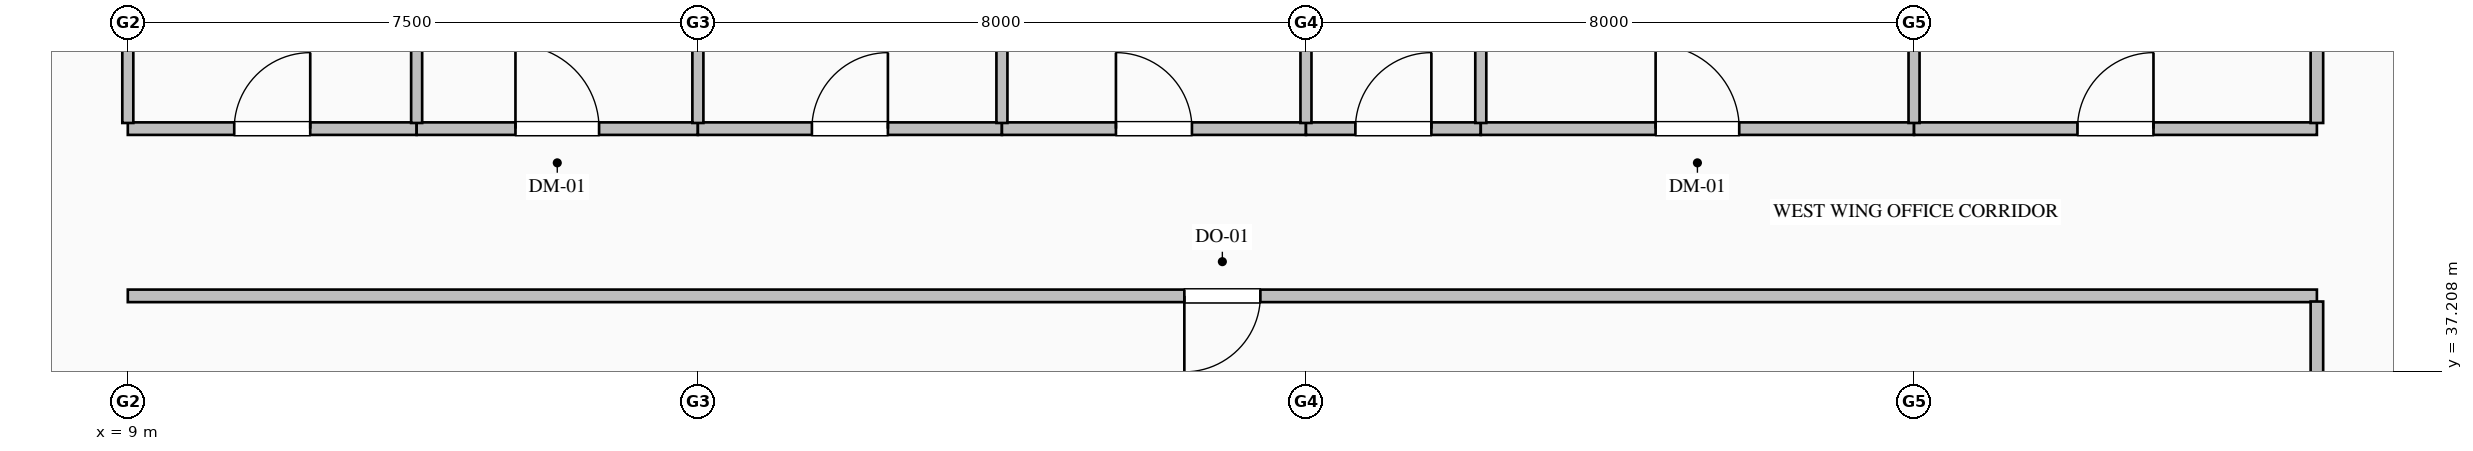
"""IFC4 building model, lengths in metres.
Left out: names, types, materials, properties, quantities, classifications, styles, units other than length and angle.
Written with IfcOpenShell. Run it as: python <this file> out.ifc"""

import sys

from ifc_helpers import new_model, si_unit, direction, frame, frame_2d, origin, place, context, subcontext, project, spatial, rectangle, extrude, element, fill, save


model = new_model("IFC4")
c1 = context("Model", 3, precision=1e-05, world=origin(), true_north=direction((0.0, 1.0)))
c2 = subcontext(c1, "Body", "Model", "MODEL_VIEW")
j1 = project(units=[si_unit("LENGTHUNIT", "METRE"), si_unit("PLANEANGLEUNIT", "RADIAN")], contexts=[c1])
p1 = place(None, origin())
s1 = spatial("IfcSite", under=j1, at=p1, CompositionType="ELEMENT")
p2 = place(p1, origin())
s2 = spatial("IfcBuilding", under=s1, at=p2, CompositionType="ELEMENT")
p3 = place(p2, frame((0.0, 0.0, 36.2)))
s3 = spatial("IfcBuildingStorey", under=s2, at=p3, CompositionType="ELEMENT", Elevation=36.2)
p4 = place(p3, frame((37.8, 38.2, 0.0), z_axis=(0.0, 0.0, 1.0), x_axis=(-1.0, 0.0, 0.0)))
e1 = element("IfcWall", 1, at=p4, inside=s3, PredefinedType="PARTITIONING", context=c2, shape_type="SweptSolid", body=[
    extrude(rectangle(XDim=28.8, YDim=0.165, at=frame_2d((14.4, 0.0))), origin(), (0.0, 0.0, 1.0), 3.75),
])
p5 = place(p4, frame((13.9, 0.0, 0.0)))
e2 = element("IfcOpeningElement", 2, at=p5, cuts=e1, PredefinedType="OPENING", context=c2, shape_type="SweptSolid", body=[
    extrude(rectangle(XDim=1.0, YDim=2.15, at=frame_2d((0.5, 1.075))), frame((0.0, 0.093, 0.0), z_axis=(0.0, -1.0, 0.0), x_axis=(1.0, 0.0, 0.0)), (0.0, 0.0, 1.0), 0.185),
])
p6 = place(p3, frame((9.0, 40.4, 0.0), z_axis=(0.0, 0.0, 1.0), x_axis=(1.0, 0.0, 0.0)))
e3 = element("IfcWall", 3, at=p6, inside=s3, PredefinedType="PARTITIONING", context=c2, shape_type="SweptSolid", body=[
    extrude(rectangle(XDim=3.8, YDim=0.165, at=frame_2d((1.9, 0.0))), origin(), (0.0, 0.0, 1.0), 3.75),
])
p7 = place(p6, frame((1.4, 0.0, 0.0)))
e4 = element("IfcOpeningElement", 4, at=p7, cuts=e3, PredefinedType="OPENING", context=c2, shape_type="SweptSolid", body=[
    extrude(rectangle(XDim=1.0, YDim=2.15, at=frame_2d((0.5, 1.075))), frame((0.0, 0.093, 0.0), z_axis=(0.0, -1.0, 0.0), x_axis=(1.0, 0.0, 0.0)), (0.0, 0.0, 1.0), 0.185),
])
p8 = place(p3, frame((12.8, 40.4, 0.0), z_axis=(0.0, 0.0, 1.0), x_axis=(1.0, 0.0, 0.0)))
e5 = element("IfcWall", 5, at=p8, inside=s3, PredefinedType="PARTITIONING", context=c2, shape_type="SweptSolid", body=[
    extrude(rectangle(XDim=3.7, YDim=0.165, at=frame_2d((1.85, 0.0))), origin(), (0.0, 0.0, 1.0), 3.75),
])
p9 = place(p8, frame((1.3, 0.0, 0.0)))
e6 = element("IfcOpeningElement", 6, at=p9, cuts=e5, PredefinedType="OPENING", context=c2, shape_type="SweptSolid", body=[
    extrude(rectangle(XDim=1.1, YDim=2.2, at=frame_2d((0.55, 1.1))), frame((0.0, 0.093, 0.0), z_axis=(0.0, -1.0, 0.0), x_axis=(1.0, 0.0, 0.0)), (0.0, 0.0, 1.0), 0.185),
])
p10 = place(p3, frame((16.5, 40.4, 0.0), z_axis=(0.0, 0.0, 1.0), x_axis=(1.0, 0.0, 0.0)))
e7 = element("IfcWall", 7, at=p10, inside=s3, PredefinedType="PARTITIONING", context=c2, shape_type="SweptSolid", body=[
    extrude(rectangle(XDim=4.0, YDim=0.165, at=frame_2d((2.0, 0.0))), origin(), (0.0, 0.0, 1.0), 3.75),
])
p11 = place(p10, frame((1.5, 0.0, 0.0)))
e8 = element("IfcOpeningElement", 8, at=p11, cuts=e7, PredefinedType="OPENING", context=c2, shape_type="SweptSolid", body=[
    extrude(rectangle(XDim=1.0, YDim=2.15, at=frame_2d((0.5, 1.075))), frame((0.0, 0.093, 0.0), z_axis=(0.0, -1.0, 0.0), x_axis=(1.0, 0.0, 0.0)), (0.0, 0.0, 1.0), 0.185),
])
p12 = place(p3, frame((20.5, 40.4, 0.0), z_axis=(0.0, 0.0, 1.0), x_axis=(1.0, 0.0, 0.0)))
e9 = element("IfcWall", 9, at=p12, inside=s3, PredefinedType="PARTITIONING", context=c2, shape_type="SweptSolid", body=[
    extrude(rectangle(XDim=4.0, YDim=0.165, at=frame_2d((2.0, 0.0))), origin(), (0.0, 0.0, 1.0), 3.75),
])
p13 = place(p12, frame((1.5, 0.0, 0.0)))
e10 = element("IfcOpeningElement", 10, at=p13, cuts=e9, PredefinedType="OPENING", context=c2, shape_type="SweptSolid", body=[
    extrude(rectangle(XDim=1.0, YDim=2.15, at=frame_2d((0.5, 1.075))), frame((0.0, 0.093, 0.0), z_axis=(0.0, -1.0, 0.0), x_axis=(1.0, 0.0, 0.0)), (0.0, 0.0, 1.0), 0.185),
])
p14 = place(p3, frame((24.5, 40.4, 0.0), z_axis=(0.0, 0.0, 1.0), x_axis=(1.0, 0.0, 0.0)))
e11 = element("IfcWall", 11, at=p14, inside=s3, PredefinedType="PARTITIONING", context=c2, shape_type="SweptSolid", body=[
    extrude(rectangle(XDim=2.3, YDim=0.165, at=frame_2d((1.15, 0.0))), origin(), (0.0, 0.0, 1.0), 3.75),
])
p15 = place(p14, frame((0.65, 0.0, 0.0)))
e12 = element("IfcOpeningElement", 12, at=p15, cuts=e11, PredefinedType="OPENING", context=c2, shape_type="SweptSolid", body=[
    extrude(rectangle(XDim=1.0, YDim=2.15, at=frame_2d((0.5, 1.075))), frame((0.0, 0.093, 0.0), z_axis=(0.0, -1.0, 0.0), x_axis=(1.0, 0.0, 0.0)), (0.0, 0.0, 1.0), 0.185),
])
p16 = place(p3, frame((26.8, 40.4, 0.0), z_axis=(0.0, 0.0, 1.0), x_axis=(1.0, 0.0, 0.0)))
e13 = element("IfcWall", 13, at=p16, inside=s3, PredefinedType="PARTITIONING", context=c2, shape_type="SweptSolid", body=[
    extrude(rectangle(XDim=5.7, YDim=0.165, at=frame_2d((2.85, 0.0))), origin(), (0.0, 0.0, 1.0), 3.75),
])
p17 = place(p16, frame((2.3, 0.0, 0.0)))
e14 = element("IfcOpeningElement", 14, at=p17, cuts=e13, PredefinedType="OPENING", context=c2, shape_type="SweptSolid", body=[
    extrude(rectangle(XDim=1.1, YDim=2.2, at=frame_2d((0.55, 1.1))), frame((0.0, 0.093, 0.0), z_axis=(0.0, -1.0, 0.0), x_axis=(1.0, 0.0, 0.0)), (0.0, 0.0, 1.0), 0.185),
])
p18 = place(p3, frame((32.5, 40.4, 0.0), z_axis=(0.0, 0.0, 1.0), x_axis=(1.0, 0.0, 0.0)))
e15 = element("IfcWall", 15, at=p18, inside=s3, PredefinedType="PARTITIONING", context=c2, shape_type="SweptSolid", body=[
    extrude(rectangle(XDim=5.3, YDim=0.165, at=frame_2d((2.65, 0.0))), origin(), (0.0, 0.0, 1.0), 3.75),
])
p19 = place(p18, frame((2.15, 0.0, 0.0)))
e16 = element("IfcOpeningElement", 16, at=p19, cuts=e15, PredefinedType="OPENING", context=c2, shape_type="SweptSolid", body=[
    extrude(rectangle(XDim=1.0, YDim=2.15, at=frame_2d((0.5, 1.075))), frame((0.0, 0.093, 0.0), z_axis=(0.0, -1.0, 0.0), x_axis=(1.0, 0.0, 0.0)), (0.0, 0.0, 1.0), 0.185),
])
p20 = place(p3, frame((37.8, 31.6, 0.0), z_axis=(0.0, 0.0, 1.0), x_axis=(0.0, 1.0, 0.0)))
e17 = element("IfcWall", 17, at=p20, inside=s3, PredefinedType="PARTITIONING", context=c2, shape_type="SweptSolid", body=[
    extrude(rectangle(XDim=6.525, YDim=0.165, at=frame_2d((3.263, 0.0))), origin(), (0.0, 0.0, 1.0), 3.75),
])
p21 = place(p3, frame((37.8, 40.475, 0.0), z_axis=(0.0, 0.0, 1.0), x_axis=(0.0, 1.0, 0.0)))
e18 = element("IfcWall", 18, at=p21, inside=s3, PredefinedType="PARTITIONING", context=c2, shape_type="SweptSolid", body=[
    extrude(rectangle(XDim=3.651, YDim=0.165, at=frame_2d((1.825, 0.0))), origin(), (0.0, 0.0, 1.0), 3.75),
])
p22 = place(p3, frame((9.0, 51.648, 0.0), z_axis=(0.0, 0.0, 1.0), x_axis=(0.0, -1.0, 0.0)))
e19 = element("IfcWall", 19, at=p22, inside=s3, PredefinedType="PARTITIONING", context=c2, shape_type="SweptSolid", body=[
    extrude(rectangle(XDim=11.173, YDim=0.145, at=frame_2d((5.587, 0.0))), origin(), (0.0, 0.0, 1.0), 3.042),
])
p23 = place(p22, frame((5.087, 0.0, 0.0)))
e20 = element("IfcOpeningElement", 20, at=p23, cuts=e19, PredefinedType="OPENING", context=c2, shape_type="SweptSolid", body=[
    extrude(rectangle(XDim=1.0, YDim=2.15, at=frame_2d((0.5, 1.075))), frame((0.0, 0.083, 0.0), z_axis=(0.0, -1.0, 0.0), x_axis=(1.0, 0.0, 0.0)), (0.0, 0.0, 1.0), 0.165),
])
p24 = place(p3, frame((12.8, 51.648, 0.0), z_axis=(0.0, 0.0, 1.0), x_axis=(0.0, -1.0, 0.0)))
e21 = element("IfcWall", 21, at=p24, inside=s3, PredefinedType="PARTITIONING", context=c2, shape_type="SweptSolid", body=[
    extrude(rectangle(XDim=11.173, YDim=0.145, at=frame_2d((5.587, 0.0))), origin(), (0.0, 0.0, 1.0), 3.75),
])
p25 = place(p3, frame((16.5, 51.648, 0.0), z_axis=(0.0, 0.0, 1.0), x_axis=(0.0, -1.0, 0.0)))
e22 = element("IfcWall", 22, at=p25, inside=s3, PredefinedType="PARTITIONING", context=c2, shape_type="SweptSolid", body=[
    extrude(rectangle(XDim=11.173, YDim=0.145, at=frame_2d((5.587, 0.0))), origin(), (0.0, 0.0, 1.0), 3.042),
])
p26 = place(p3, frame((20.5, 51.648, 0.0), z_axis=(0.0, 0.0, 1.0), x_axis=(0.0, -1.0, 0.0)))
e23 = element("IfcWall", 23, at=p26, inside=s3, PredefinedType="PARTITIONING", context=c2, shape_type="SweptSolid", body=[
    extrude(rectangle(XDim=11.173, YDim=0.145, at=frame_2d((5.587, 0.0))), origin(), (0.0, 0.0, 1.0), 3.75),
])
p27 = place(p3, frame((24.5, 51.648, 0.0), z_axis=(0.0, 0.0, 1.0), x_axis=(0.0, -1.0, 0.0)))
e24 = element("IfcWall", 24, at=p27, inside=s3, PredefinedType="PARTITIONING", context=c2, shape_type="SweptSolid", body=[
    extrude(rectangle(XDim=11.173, YDim=0.145, at=frame_2d((5.587, 0.0))), origin(), (0.0, 0.0, 1.0), 3.042),
])
for number, where, z_axis, x_axis in (
    (25, (26.8, 51.648, 0.0), (0.0, 0.0, 1.0), (0.0, -1.0, 0.0)),
    (26, (32.5, 51.648, 0.0), (0.0, 0.0, 1.0), (0.0, -1.0, 0.0)),
):
    element("IfcWall", number, at=place(p3, frame(where, z_axis=z_axis, x_axis=x_axis)), inside=s3, PredefinedType="PARTITIONING", context=c2, shape_type="SweptSolid", body=[
        extrude(rectangle(XDim=11.173, YDim=0.145, at=frame_2d((5.587, 0.0))), origin(), (0.0, 0.0, 1.0), 3.75),
    ])
p28 = place(p5, origin())
e27 = element("IfcDoor", 27, at=p28, inside=s3, OperationType="SINGLE_SWING_RIGHT", PredefinedType="DOOR", context=c2, shape_type="SweptSolid", body=[
    extrude(rectangle(XDim=1.0, YDim=2.15, at=frame_2d((0.5, 1.075))), frame((0.0, 0.025, 0.0), z_axis=(0.0, -1.0, 0.0), x_axis=(1.0, 0.0, 0.0)), (0.0, 0.0, 1.0), 0.05),
])
fill(e2, e27)
p29 = place(p7, origin())
e28 = element("IfcDoor", 28, at=p29, inside=s3, OperationType="SINGLE_SWING_RIGHT", PredefinedType="DOOR", context=c2, shape_type="SweptSolid", body=[
    extrude(rectangle(XDim=1.0, YDim=2.15, at=frame_2d((0.5, 1.075))), frame((0.0, 0.025, 0.0), z_axis=(0.0, -1.0, 0.0), x_axis=(1.0, 0.0, 0.0)), (0.0, 0.0, 1.0), 0.05),
])
fill(e4, e28)
p30 = place(p9, origin())
e29 = element("IfcDoor", 29, at=p30, inside=s3, OperationType="SINGLE_SWING_LEFT", PredefinedType="DOOR", context=c2, shape_type="SweptSolid", body=[
    extrude(rectangle(XDim=1.1, YDim=2.2, at=frame_2d((0.55, 1.1))), frame((0.0, 0.025, 0.0), z_axis=(0.0, -1.0, 0.0), x_axis=(1.0, 0.0, 0.0)), (0.0, 0.0, 1.0), 0.05),
])
fill(e6, e29)
p31 = place(p11, origin())
e30 = element("IfcDoor", 30, at=p31, inside=s3, OperationType="SINGLE_SWING_RIGHT", PredefinedType="DOOR", context=c2, shape_type="SweptSolid", body=[
    extrude(rectangle(XDim=1.0, YDim=2.15, at=frame_2d((0.5, 1.075))), frame((0.0, 0.025, 0.0), z_axis=(0.0, -1.0, 0.0), x_axis=(1.0, 0.0, 0.0)), (0.0, 0.0, 1.0), 0.05),
])
fill(e8, e30)
p32 = place(p13, origin())
e31 = element("IfcDoor", 31, at=p32, inside=s3, OperationType="SINGLE_SWING_LEFT", PredefinedType="DOOR", context=c2, shape_type="SweptSolid", body=[
    extrude(rectangle(XDim=1.0, YDim=2.15, at=frame_2d((0.5, 1.075))), frame((0.0, 0.025, 0.0), z_axis=(0.0, -1.0, 0.0), x_axis=(1.0, 0.0, 0.0)), (0.0, 0.0, 1.0), 0.05),
])
fill(e10, e31)
p33 = place(p15, origin())
e32 = element("IfcDoor", 32, at=p33, inside=s3, OperationType="SINGLE_SWING_RIGHT", PredefinedType="DOOR", context=c2, shape_type="SweptSolid", body=[
    extrude(rectangle(XDim=1.0, YDim=2.15, at=frame_2d((0.5, 1.075))), frame((0.0, 0.025, 0.0), z_axis=(0.0, -1.0, 0.0), x_axis=(1.0, 0.0, 0.0)), (0.0, 0.0, 1.0), 0.05),
])
fill(e12, e32)
p34 = place(p17, origin())
e33 = element("IfcDoor", 33, at=p34, inside=s3, OperationType="SINGLE_SWING_LEFT", PredefinedType="DOOR", context=c2, shape_type="SweptSolid", body=[
    extrude(rectangle(XDim=1.1, YDim=2.2, at=frame_2d((0.55, 1.1))), frame((0.0, 0.025, 0.0), z_axis=(0.0, -1.0, 0.0), x_axis=(1.0, 0.0, 0.0)), (0.0, 0.0, 1.0), 0.05),
])
fill(e14, e33)
p35 = place(p19, origin())
e34 = element("IfcDoor", 34, at=p35, inside=s3, OperationType="SINGLE_SWING_RIGHT", PredefinedType="DOOR", context=c2, shape_type="SweptSolid", body=[
    extrude(rectangle(XDim=1.0, YDim=2.15, at=frame_2d((0.5, 1.075))), frame((0.0, 0.025, 0.0), z_axis=(0.0, -1.0, 0.0), x_axis=(1.0, 0.0, 0.0)), (0.0, 0.0, 1.0), 0.05),
])
fill(e16, e34)
save(model, sys.argv[1])
